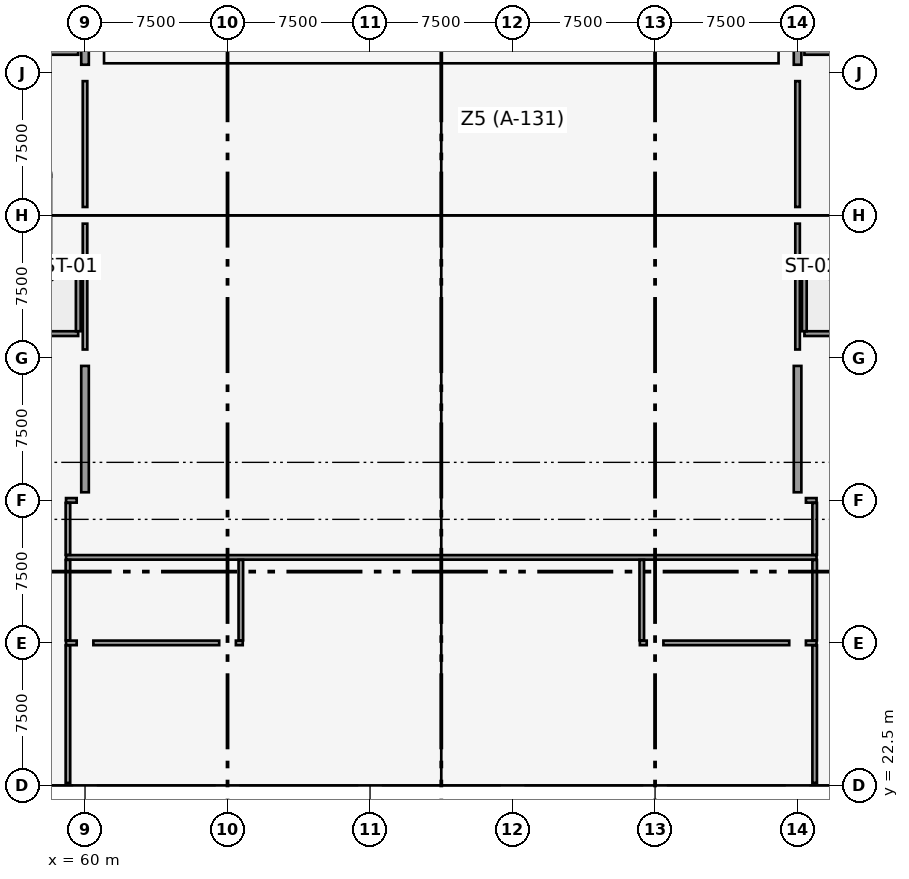
"""IFC4 building model, lengths in metres.
Left out: names, types, materials, properties, quantities, classifications, styles, units other than length and angle.
Written with IfcOpenShell. Run it as: python <this file> out.ifc"""

import sys

from ifc_helpers import new_model, si_unit, direction, frame, frame_2d, origin, origin_2d, place, context, subcontext, project, spatial, rectangle, extrude, element, fill, save


model = new_model("IFC4")
c1 = context("Model", 3, precision=1e-05, world=origin(), true_north=direction((0.0, 1.0)))
c2 = subcontext(c1, "Body", "Model", "MODEL_VIEW")
j1 = project(units=[si_unit("LENGTHUNIT", "METRE"), si_unit("PLANEANGLEUNIT", "RADIAN")], contexts=[c1])
p1 = place(None, origin())
s1 = spatial("IfcSite", under=j1, at=p1, CompositionType="ELEMENT")
p2 = place(p1, origin())
s2 = spatial("IfcBuilding", under=s1, at=p2, CompositionType="ELEMENT")
p3 = place(p2, frame((0.0, 0.0, 4.8)))
s3 = spatial("IfcBuildingStorey", under=s2, at=p3, CompositionType="ELEMENT", Elevation=4.8)
for number, where, z_axis, x_axis in (
    (1, (60.0, 22.5, 0.0), (0.0, 0.0, 1.0), (1.0, 0.0, 0.0)),
    (2, (60.0, 30.0, 0.0), (0.0, 0.0, 1.0), (1.0, 0.0, 0.0)),
    (3, (60.0, 37.5, 0.0), (0.0, 0.0, 1.0), (1.0, 0.0, 0.0)),
    (4, (60.0, 45.0, 0.0), (0.0, 0.0, 1.0), (1.0, 0.0, 0.0)),
    (5, (60.0, 52.5, 0.0), (0.0, 0.0, 1.0), (1.0, 0.0, 0.0)),
    (6, (60.0, 60.0, 0.0), (0.0, 0.0, 1.0), (1.0, 0.0, 0.0)),
    (7, (67.5, 22.5, 0.0), (0.0, 0.0, 1.0), (1.0, 0.0, 0.0)),
    (8, (67.5, 30.0, 0.0), (0.0, 0.0, 1.0), (1.0, 0.0, 0.0)),
    (9, (75.0, 22.5, 0.0), (0.0, 0.0, 1.0), (1.0, 0.0, 0.0)),
    (10, (75.0, 30.0, 0.0), (0.0, 0.0, 1.0), (1.0, 0.0, 0.0)),
    (11, (82.5, 22.5, 0.0), (0.0, 0.0, 1.0), (1.0, 0.0, 0.0)),
    (12, (82.5, 30.0, 0.0), (0.0, 0.0, 1.0), (1.0, 0.0, 0.0)),
    (13, (90.0, 22.5, 0.0), (0.0, 0.0, 1.0), (1.0, 0.0, 0.0)),
    (14, (90.0, 30.0, 0.0), (0.0, 0.0, 1.0), (1.0, 0.0, 0.0)),
    (15, (97.5, 22.5, 0.0), (0.0, 0.0, 1.0), (1.0, 0.0, 0.0)),
    (16, (97.5, 30.0, 0.0), (0.0, 0.0, 1.0), (1.0, 0.0, 0.0)),
    (17, (97.5, 37.5, 0.0), (0.0, 0.0, 1.0), (1.0, 0.0, 0.0)),
    (18, (97.5, 45.0, 0.0), (0.0, 0.0, 1.0), (1.0, 0.0, 0.0)),
    (19, (97.5, 52.5, 0.0), (0.0, 0.0, 1.0), (1.0, 0.0, 0.0)),
    (20, (97.5, 60.0, 0.0), (0.0, 0.0, 1.0), (1.0, 0.0, 0.0)),
):
    element("IfcColumn", number, at=place(p3, frame(where, z_axis=z_axis, x_axis=x_axis)), inside=s3, PredefinedType="COLUMN", context=c2, shape_type="SweptSolid", body=[
        extrude(rectangle(XDim=0.85, YDim=0.85, at=origin_2d()), origin(), (0.0, 0.0, 1.0), 4.2),
    ])
p4 = place(p3, frame((60.0, 37.925, 0.0), z_axis=(0.0, 0.0, 1.0), x_axis=(0.0, 1.0, 0.0)))
e21 = element("IfcWall", 21, at=p4, inside=s3, PredefinedType="SHEAR", context=c2, shape_type="SweptSolid", body=[
    extrude(rectangle(XDim=6.65, YDim=0.4, at=frame_2d((3.325, 0.0))), origin(), (0.0, 0.0, 1.0), 2.72),
])
p5 = place(p3, frame((60.0, 60.425, 0.0), z_axis=(0.0, 0.0, 1.0), x_axis=(0.0, 1.0, 0.0)))
e22 = element("IfcWall", 22, at=p5, inside=s3, PredefinedType="SHEAR", context=c2, shape_type="SweptSolid", body=[
    extrude(rectangle(XDim=6.65, YDim=0.4, at=frame_2d((3.325, 0.0))), origin(), (0.0, 0.0, 1.0), 2.97),
])
p6 = place(p3, frame((97.5, 37.925, 0.0), z_axis=(0.0, 0.0, 1.0), x_axis=(0.0, 1.0, 0.0)))
e23 = element("IfcWall", 23, at=p6, inside=s3, PredefinedType="SHEAR", context=c2, shape_type="SweptSolid", body=[
    extrude(rectangle(XDim=6.65, YDim=0.4, at=frame_2d((3.325, 0.0))), origin(), (0.0, 0.0, 1.0), 2.72),
])
p7 = place(p3, frame((97.5, 60.425, 0.0), z_axis=(0.0, 0.0, 1.0), x_axis=(0.0, 1.0, 0.0)))
e24 = element("IfcWall", 24, at=p7, inside=s3, PredefinedType="SHEAR", context=c2, shape_type="SweptSolid", body=[
    extrude(rectangle(XDim=6.65, YDim=0.4, at=frame_2d((3.325, 0.0))), origin(), (0.0, 0.0, 1.0), 2.87),
])
p8 = place(p3, frame((52.38, 46.275, 0.0), z_axis=(0.0, 0.0, 1.0), x_axis=(1.0, 0.0, 0.0)))
e25 = element("IfcWall", 25, at=p8, inside=s3, PredefinedType="SOLIDWALL", context=c2, shape_type="SweptSolid", body=[
    extrude(rectangle(XDim=7.26, YDim=0.25, at=frame_2d((3.63, 0.0))), origin(), (0.0, 0.0, 1.0), 3.92),
])
p9 = place(p8, frame((0.62, 0.0, 0.0)))
e26 = element("IfcOpeningElement", 26, at=p9, cuts=e25, PredefinedType="OPENING", context=c2, shape_type="SweptSolid", body=[
    extrude(rectangle(XDim=1.1, YDim=2.15, at=frame_2d((0.55, 1.075))), frame((0.0, 0.135, 0.0), z_axis=(0.0, -1.0, 0.0), x_axis=(1.0, 0.0, 0.0)), (0.0, 0.0, 1.0), 0.27),
])
p10 = place(p3, frame((52.38, 50.085, 0.0), z_axis=(0.0, 0.0, 1.0), x_axis=(1.0, 0.0, 0.0)))
e27 = element("IfcWall", 27, at=p10, inside=s3, PredefinedType="SOLIDWALL", context=c2, shape_type="SweptSolid", body=[
    extrude(rectangle(XDim=7.26, YDim=0.25, at=frame_2d((3.63, 0.0))), origin(), (0.0, 0.0, 1.0), 3.92),
])
p11 = place(p10, frame((0.62, 0.0, 0.0)))
e28 = element("IfcOpeningElement", 28, at=p11, cuts=e27, PredefinedType="OPENING", context=c2, shape_type="SweptSolid", body=[
    extrude(rectangle(XDim=1.1, YDim=2.15, at=frame_2d((0.55, 1.075))), frame((0.0, 0.135, 0.0), z_axis=(0.0, -1.0, 0.0), x_axis=(1.0, 0.0, 0.0)), (0.0, 0.0, 1.0), 0.27),
])
p12 = place(p3, frame((59.645, 46.4, 0.0), z_axis=(0.0, 0.0, 1.0), x_axis=(0.0, 1.0, 0.0)))
e29 = element("IfcWall", 29, at=p12, inside=s3, PredefinedType="SOLIDWALL", context=c2, shape_type="SweptSolid", body=[
    extrude(rectangle(XDim=3.56, YDim=0.25, at=frame_2d((1.78, 0.0))), origin(), (0.0, 0.0, 1.0), 3.92),
])
p13 = place(p3, frame((97.86, 46.275, 0.0), z_axis=(0.0, 0.0, 1.0), x_axis=(1.0, 0.0, 0.0)))
e30 = element("IfcWall", 30, at=p13, inside=s3, PredefinedType="SOLIDWALL", context=c2, shape_type="SweptSolid", body=[
    extrude(rectangle(XDim=7.26, YDim=0.25, at=frame_2d((3.63, 0.0))), origin(), (0.0, 0.0, 1.0), 3.92),
])
p14 = place(p13, frame((5.54, 0.0, 0.0)))
e31 = element("IfcOpeningElement", 31, at=p14, cuts=e30, PredefinedType="OPENING", context=c2, shape_type="SweptSolid", body=[
    extrude(rectangle(XDim=1.1, YDim=2.15, at=frame_2d((0.55, 1.075))), frame((0.0, 0.135, 0.0), z_axis=(0.0, -1.0, 0.0), x_axis=(1.0, 0.0, 0.0)), (0.0, 0.0, 1.0), 0.27),
])
p15 = place(p3, frame((97.86, 50.085, 0.0), z_axis=(0.0, 0.0, 1.0), x_axis=(1.0, 0.0, 0.0)))
e32 = element("IfcWall", 32, at=p15, inside=s3, PredefinedType="SOLIDWALL", context=c2, shape_type="SweptSolid", body=[
    extrude(rectangle(XDim=7.26, YDim=0.25, at=frame_2d((3.63, 0.0))), origin(), (0.0, 0.0, 1.0), 3.92),
])
p16 = place(p15, frame((5.54, 0.0, 0.0)))
e33 = element("IfcOpeningElement", 33, at=p16, cuts=e32, PredefinedType="OPENING", context=c2, shape_type="SweptSolid", body=[
    extrude(rectangle(XDim=1.1, YDim=2.15, at=frame_2d((0.55, 1.075))), frame((0.0, 0.135, 0.0), z_axis=(0.0, -1.0, 0.0), x_axis=(1.0, 0.0, 0.0)), (0.0, 0.0, 1.0), 0.27),
])
p17 = place(p3, frame((97.855, 46.4, 0.0), z_axis=(0.0, 0.0, 1.0), x_axis=(0.0, 1.0, 0.0)))
e34 = element("IfcWall", 34, at=p17, inside=s3, PredefinedType="SOLIDWALL", context=c2, shape_type="SweptSolid", body=[
    extrude(rectangle(XDim=3.56, YDim=0.25, at=frame_2d((1.78, 0.0))), origin(), (0.0, 0.0, 1.0), 3.92),
])
p18 = place(p3, frame((52.38, 61.075, 0.0), z_axis=(0.0, 0.0, 1.0), x_axis=(1.0, 0.0, 0.0)))
e35 = element("IfcWall", 35, at=p18, inside=s3, PredefinedType="SOLIDWALL", context=c2, shape_type="SweptSolid", body=[
    extrude(rectangle(XDim=7.26, YDim=0.25, at=frame_2d((3.63, 0.0))), origin(), (0.0, 0.0, 1.0), 3.92),
])
p19 = place(p18, frame((0.62, 0.0, 0.0)))
e36 = element("IfcOpeningElement", 36, at=p19, cuts=e35, PredefinedType="OPENING", context=c2, shape_type="SweptSolid", body=[
    extrude(rectangle(XDim=1.1, YDim=2.15, at=frame_2d((0.55, 1.075))), frame((0.0, 0.135, 0.0), z_axis=(0.0, -1.0, 0.0), x_axis=(1.0, 0.0, 0.0)), (0.0, 0.0, 1.0), 0.27),
])
p20 = place(p3, frame((97.86, 61.075, 0.0), z_axis=(0.0, 0.0, 1.0), x_axis=(1.0, 0.0, 0.0)))
e37 = element("IfcWall", 37, at=p20, inside=s3, PredefinedType="SOLIDWALL", context=c2, shape_type="SweptSolid", body=[
    extrude(rectangle(XDim=7.26, YDim=0.25, at=frame_2d((3.63, 0.0))), origin(), (0.0, 0.0, 1.0), 3.92),
])
p21 = place(p20, frame((5.54, 0.0, 0.0)))
e38 = element("IfcOpeningElement", 38, at=p21, cuts=e37, PredefinedType="OPENING", context=c2, shape_type="SweptSolid", body=[
    extrude(rectangle(XDim=1.1, YDim=2.15, at=frame_2d((0.55, 1.075))), frame((0.0, 0.135, 0.0), z_axis=(0.0, -1.0, 0.0), x_axis=(1.0, 0.0, 0.0)), (0.0, 0.0, 1.0), 0.27),
])
p22 = place(p3, frame((59.0, 30.0, 0.0), z_axis=(0.0, 0.0, 1.0), x_axis=(1.0, 0.0, 0.0)))
e39 = element("IfcWall", 39, at=p22, inside=s3, PredefinedType="PARTITIONING", context=c2, shape_type="SweptSolid", body=[
    extrude(rectangle(XDim=0.561, YDim=0.24, at=frame_2d((0.281, 0.0))), origin(), (0.0, 0.0, 1.0), 2.69),
])
p23 = place(p3, frame((60.439, 30.0, 0.0), z_axis=(0.0, 0.0, 1.0), x_axis=(1.0, 0.0, 0.0)))
e40 = element("IfcWall", 40, at=p23, inside=s3, PredefinedType="PARTITIONING", context=c2, shape_type="SweptSolid", body=[
    extrude(rectangle(XDim=6.622, YDim=0.24, at=frame_2d((3.311, 0.0))), origin(), (0.0, 0.0, 1.0), 2.69),
])
p24 = place(p3, frame((67.939, 30.0, 0.0), z_axis=(0.0, 0.0, 1.0), x_axis=(1.0, 0.0, 0.0)))
e41 = element("IfcWall", 41, at=p24, inside=s3, PredefinedType="PARTITIONING", context=c2, shape_type="SweptSolid", body=[
    extrude(rectangle(XDim=0.361, YDim=0.24, at=frame_2d((0.181, 0.0))), origin(), (0.0, 0.0, 1.0), 2.99),
])
p25 = place(p3, frame((89.2, 30.0, 0.0), z_axis=(0.0, 0.0, 1.0), x_axis=(1.0, 0.0, 0.0)))
e42 = element("IfcWall", 42, at=p25, inside=s3, PredefinedType="PARTITIONING", context=c2, shape_type="SweptSolid", body=[
    extrude(rectangle(XDim=0.361, YDim=0.24, at=frame_2d((0.181, 0.0))), origin(), (0.0, 0.0, 1.0), 3.04),
])
p26 = place(p3, frame((90.439, 30.0, 0.0), z_axis=(0.0, 0.0, 1.0), x_axis=(1.0, 0.0, 0.0)))
e43 = element("IfcWall", 43, at=p26, inside=s3, PredefinedType="PARTITIONING", context=c2, shape_type="SweptSolid", body=[
    extrude(rectangle(XDim=6.622, YDim=0.24, at=frame_2d((3.311, 0.0))), origin(), (0.0, 0.0, 1.0), 2.69),
])
for number, where, z_axis, x_axis in (
    (44, (97.939, 30.0, 0.0), (0.0, 0.0, 1.0), (1.0, 0.0, 0.0)),
    (45, (59.0, 37.5, 0.0), (0.0, 0.0, 1.0), (1.0, 0.0, 0.0)),
    (46, (97.939, 37.5, 0.0), (0.0, 0.0, 1.0), (1.0, 0.0, 0.0)),
):
    element("IfcWall", number, at=place(p3, frame(where, z_axis=z_axis, x_axis=x_axis)), inside=s3, PredefinedType="PARTITIONING", context=c2, shape_type="SweptSolid", body=[
        extrude(rectangle(XDim=0.561, YDim=0.24, at=frame_2d((0.281, 0.0))), origin(), (0.0, 0.0, 1.0), 2.69),
    ])
p27 = place(p3, frame((59.0, 34.5, 0.0), z_axis=(0.0, 0.0, 1.0), x_axis=(1.0, 0.0, 0.0)))
e47 = element("IfcWall", 47, at=p27, inside=s3, PredefinedType="PARTITIONING", context=c2, shape_type="SweptSolid", body=[
    extrude(rectangle(XDim=39.5, YDim=0.24, at=frame_2d((19.75, 0.0))), origin(), (0.0, 0.0, 1.0), 2.69),
])
p28 = place(p27, frame((3.85, 0.0, 0.0)))
e48 = element("IfcOpeningElement", 48, at=p28, cuts=e47, PredefinedType="OPENING", context=c2, shape_type="SweptSolid", body=[
    extrude(rectangle(XDim=1.8, YDim=2.16, at=frame_2d((0.9, 1.08))), frame((0.0, 0.13, 0.0), z_axis=(0.0, -1.0, 0.0), x_axis=(1.0, 0.0, 0.0)), (0.0, 0.0, 1.0), 0.26),
])
p29 = place(p27, frame((33.85, 0.0, 0.0)))
e49 = element("IfcOpeningElement", 49, at=p29, cuts=e47, PredefinedType="OPENING", context=c2, shape_type="SweptSolid", body=[
    extrude(rectangle(XDim=1.8, YDim=2.16, at=frame_2d((0.9, 1.08))), frame((0.0, 0.13, 0.0), z_axis=(0.0, -1.0, 0.0), x_axis=(1.0, 0.0, 0.0)), (0.0, 0.0, 1.0), 0.26),
])
p30 = place(p3, frame((68.2, 30.134, 0.0), z_axis=(0.0, 0.0, 1.0), x_axis=(0.0, 1.0, 0.0)))
e50 = element("IfcWall", 50, at=p30, inside=s3, PredefinedType="PARTITIONING", context=c2, shape_type="SweptSolid", body=[
    extrude(rectangle(XDim=4.232, YDim=0.24, at=frame_2d((2.116, 0.0))), origin(), (0.0, 0.0, 1.0), 2.99),
])
p31 = place(p30, frame((1.366, 0.0, 0.0)))
e51 = element("IfcOpeningElement", 51, at=p31, cuts=e50, PredefinedType="OPENING", context=c2, shape_type="SweptSolid", body=[
    extrude(rectangle(XDim=1.5, YDim=2.16, at=frame_2d((0.75, 1.08))), frame((0.0, 0.13, 0.0), z_axis=(0.0, -1.0, 0.0), x_axis=(1.0, 0.0, 0.0)), (0.0, 0.0, 1.0), 0.26),
])
p32 = place(p3, frame((89.3, 30.134, 0.0), z_axis=(0.0, 0.0, 1.0), x_axis=(0.0, 1.0, 0.0)))
e52 = element("IfcWall", 52, at=p32, inside=s3, PredefinedType="PARTITIONING", context=c2, shape_type="SweptSolid", body=[
    extrude(rectangle(XDim=4.232, YDim=0.24, at=frame_2d((2.116, 0.0))), origin(), (0.0, 0.0, 1.0), 3.04),
])
p33 = place(p32, frame((1.366, 0.0, 0.0)))
e53 = element("IfcOpeningElement", 53, at=p33, cuts=e52, PredefinedType="OPENING", context=c2, shape_type="SweptSolid", body=[
    extrude(rectangle(XDim=1.5, YDim=2.16, at=frame_2d((0.75, 1.08))), frame((0.0, 0.13, 0.0), z_axis=(0.0, -1.0, 0.0), x_axis=(1.0, 0.0, 0.0)), (0.0, 0.0, 1.0), 0.26),
])
p34 = place(p3, frame((59.1, 22.632, 0.0), z_axis=(0.0, 0.0, 1.0), x_axis=(0.0, 1.0, 0.0)))
e54 = element("IfcWall", 54, at=p34, inside=s3, PredefinedType="PARTITIONING", context=c2, shape_type="SweptSolid", body=[
    extrude(rectangle(XDim=7.234, YDim=0.24, at=frame_2d((3.617, 0.0))), origin(), (0.0, 0.0, 1.0), 2.94),
])
p35 = place(p34, frame((2.868, 0.0, 0.0)))
e55 = element("IfcOpeningElement", 55, at=p35, cuts=e54, PredefinedType="OPENING", context=c2, shape_type="SweptSolid", body=[
    extrude(rectangle(XDim=1.5, YDim=2.16, at=frame_2d((0.75, 1.08))), frame((0.0, 0.13, 0.0), z_axis=(0.0, -1.0, 0.0), x_axis=(1.0, 0.0, 0.0)), (0.0, 0.0, 1.0), 0.26),
])
p36 = place(p3, frame((59.1, 30.134, 0.0), z_axis=(0.0, 0.0, 1.0), x_axis=(0.0, 1.0, 0.0)))
e56 = element("IfcWall", 56, at=p36, inside=s3, PredefinedType="PARTITIONING", context=c2, shape_type="SweptSolid", body=[
    extrude(rectangle(XDim=4.232, YDim=0.24, at=frame_2d((2.116, 0.0))), origin(), (0.0, 0.0, 1.0), 2.94),
])
p37 = place(p36, frame((1.216, 0.0, 0.0)))
e57 = element("IfcOpeningElement", 57, at=p37, cuts=e56, PredefinedType="OPENING", context=c2, shape_type="SweptSolid", body=[
    extrude(rectangle(XDim=1.8, YDim=2.16, at=frame_2d((0.9, 1.08))), frame((0.0, 0.13, 0.0), z_axis=(0.0, -1.0, 0.0), x_axis=(1.0, 0.0, 0.0)), (0.0, 0.0, 1.0), 0.26),
])
p38 = place(p3, frame((59.1, 34.634, 0.0), z_axis=(0.0, 0.0, 1.0), x_axis=(0.0, 1.0, 0.0)))
e58 = element("IfcWall", 58, at=p38, inside=s3, PredefinedType="PARTITIONING", context=c2, shape_type="SweptSolid", body=[
    extrude(rectangle(XDim=2.732, YDim=0.24, at=frame_2d((1.366, 0.0))), origin(), (0.0, 0.0, 1.0), 2.99),
])
p39 = place(p3, frame((98.4, 22.632, 0.0), z_axis=(0.0, 0.0, 1.0), x_axis=(0.0, 1.0, 0.0)))
e59 = element("IfcWall", 59, at=p39, inside=s3, PredefinedType="PARTITIONING", context=c2, shape_type="SweptSolid", body=[
    extrude(rectangle(XDim=7.234, YDim=0.24, at=frame_2d((3.617, 0.0))), origin(), (0.0, 0.0, 1.0), 2.84),
])
p40 = place(p39, frame((2.868, 0.0, 0.0)))
e60 = element("IfcOpeningElement", 60, at=p40, cuts=e59, PredefinedType="OPENING", context=c2, shape_type="SweptSolid", body=[
    extrude(rectangle(XDim=1.5, YDim=2.16, at=frame_2d((0.75, 1.08))), frame((0.0, 0.13, 0.0), z_axis=(0.0, -1.0, 0.0), x_axis=(1.0, 0.0, 0.0)), (0.0, 0.0, 1.0), 0.26),
])
p41 = place(p3, frame((98.4, 30.134, 0.0), z_axis=(0.0, 0.0, 1.0), x_axis=(0.0, 1.0, 0.0)))
e61 = element("IfcWall", 61, at=p41, inside=s3, PredefinedType="PARTITIONING", context=c2, shape_type="SweptSolid", body=[
    extrude(rectangle(XDim=4.232, YDim=0.24, at=frame_2d((2.116, 0.0))), origin(), (0.0, 0.0, 1.0), 2.84),
])
p42 = place(p41, frame((1.216, 0.0, 0.0)))
e62 = element("IfcOpeningElement", 62, at=p42, cuts=e61, PredefinedType="OPENING", context=c2, shape_type="SweptSolid", body=[
    extrude(rectangle(XDim=1.8, YDim=2.16, at=frame_2d((0.9, 1.08))), frame((0.0, 0.13, 0.0), z_axis=(0.0, -1.0, 0.0), x_axis=(1.0, 0.0, 0.0)), (0.0, 0.0, 1.0), 0.26),
])
p43 = place(p3, frame((98.4, 34.634, 0.0), z_axis=(0.0, 0.0, 1.0), x_axis=(0.0, 1.0, 0.0)))
e63 = element("IfcWall", 63, at=p43, inside=s3, PredefinedType="PARTITIONING", context=c2, shape_type="SweptSolid", body=[
    extrude(rectangle(XDim=2.732, YDim=0.24, at=frame_2d((1.366, 0.0))), origin(), (0.0, 0.0, 1.0), 3.09),
])
p44 = place(p3, frame((60.0, 45.439, 0.0), z_axis=(0.0, 0.0, 1.0), x_axis=(0.0, 1.0, 0.0)))
e64 = element("IfcWall", 64, at=p44, inside=s3, PredefinedType="PARTITIONING", context=c2, shape_type="SweptSolid", body=[
    extrude(rectangle(XDim=6.622, YDim=0.24, at=frame_2d((3.311, 0.0))), origin(), (0.0, 0.0, 1.0), 2.84),
])
p45 = place(p3, frame((60.0, 52.939, 0.0), z_axis=(0.0, 0.0, 1.0), x_axis=(0.0, 1.0, 0.0)))
e65 = element("IfcWall", 65, at=p45, inside=s3, PredefinedType="PARTITIONING", context=c2, shape_type="SweptSolid", body=[
    extrude(rectangle(XDim=6.622, YDim=0.24, at=frame_2d((3.311, 0.0))), origin(), (0.0, 0.0, 1.0), 2.84),
])
p46 = place(p45, frame((2.411, 0.0, 0.0)))
e66 = element("IfcOpeningElement", 66, at=p46, cuts=e65, PredefinedType="OPENING", context=c2, shape_type="SweptSolid", body=[
    extrude(rectangle(XDim=1.8, YDim=2.16, at=frame_2d((0.9, 1.08))), frame((0.0, 0.13, 0.0), z_axis=(0.0, -1.0, 0.0), x_axis=(1.0, 0.0, 0.0)), (0.0, 0.0, 1.0), 0.26),
])
p47 = place(p3, frame((97.5, 45.439, 0.0), z_axis=(0.0, 0.0, 1.0), x_axis=(0.0, 1.0, 0.0)))
e67 = element("IfcWall", 67, at=p47, inside=s3, PredefinedType="PARTITIONING", context=c2, shape_type="SweptSolid", body=[
    extrude(rectangle(XDim=6.622, YDim=0.24, at=frame_2d((3.311, 0.0))), origin(), (0.0, 0.0, 1.0), 2.94),
])
p48 = place(p3, frame((97.5, 52.939, 0.0), z_axis=(0.0, 0.0, 1.0), x_axis=(0.0, 1.0, 0.0)))
e68 = element("IfcWall", 68, at=p48, inside=s3, PredefinedType="PARTITIONING", context=c2, shape_type="SweptSolid", body=[
    extrude(rectangle(XDim=6.622, YDim=0.24, at=frame_2d((3.311, 0.0))), origin(), (0.0, 0.0, 1.0), 2.99),
])
p49 = place(p48, frame((2.411, 0.0, 0.0)))
e69 = element("IfcOpeningElement", 69, at=p49, cuts=e68, PredefinedType="OPENING", context=c2, shape_type="SweptSolid", body=[
    extrude(rectangle(XDim=1.8, YDim=2.16, at=frame_2d((0.9, 1.08))), frame((0.0, 0.13, 0.0), z_axis=(0.0, -1.0, 0.0), x_axis=(1.0, 0.0, 0.0)), (0.0, 0.0, 1.0), 0.26),
])
p50 = place(p28, origin())
e70 = element("IfcDoor", 70, at=p50, inside=s3, OperationType="SINGLE_SWING_RIGHT", PredefinedType="DOOR", context=c2, shape_type="SweptSolid", body=[
    extrude(rectangle(XDim=1.8, YDim=2.16, at=frame_2d((0.9, 1.08))), frame((0.0, 0.025, 0.0), z_axis=(0.0, -1.0, 0.0), x_axis=(1.0, 0.0, 0.0)), (0.0, 0.0, 1.0), 0.05),
])
fill(e48, e70)
p51 = place(p29, origin())
e71 = element("IfcDoor", 71, at=p51, inside=s3, OperationType="SINGLE_SWING_LEFT", PredefinedType="DOOR", context=c2, shape_type="SweptSolid", body=[
    extrude(rectangle(XDim=1.8, YDim=2.16, at=frame_2d((0.9, 1.08))), frame((0.0, 0.025, 0.0), z_axis=(0.0, -1.0, 0.0), x_axis=(1.0, 0.0, 0.0)), (0.0, 0.0, 1.0), 0.05),
])
fill(e49, e71)
p52 = place(p31, origin())
e72 = element("IfcDoor", 72, at=p52, inside=s3, OperationType="SINGLE_SWING_RIGHT", PredefinedType="DOOR", context=c2, shape_type="SweptSolid", body=[
    extrude(rectangle(XDim=1.5, YDim=2.16, at=frame_2d((0.75, 1.08))), frame((0.0, 0.025, 0.0), z_axis=(0.0, -1.0, 0.0), x_axis=(1.0, 0.0, 0.0)), (0.0, 0.0, 1.0), 0.05),
])
fill(e51, e72)
p53 = place(p33, origin())
e73 = element("IfcDoor", 73, at=p53, inside=s3, OperationType="SINGLE_SWING_LEFT", PredefinedType="DOOR", context=c2, shape_type="SweptSolid", body=[
    extrude(rectangle(XDim=1.5, YDim=2.16, at=frame_2d((0.75, 1.08))), frame((0.0, 0.025, 0.0), z_axis=(0.0, -1.0, 0.0), x_axis=(1.0, 0.0, 0.0)), (0.0, 0.0, 1.0), 0.05),
])
fill(e53, e73)
p54 = place(p35, origin())
e74 = element("IfcDoor", 74, at=p54, inside=s3, OperationType="SINGLE_SWING_RIGHT", PredefinedType="DOOR", context=c2, shape_type="SweptSolid", body=[
    extrude(rectangle(XDim=1.5, YDim=2.16, at=frame_2d((0.75, 1.08))), frame((0.0, 0.025, 0.0), z_axis=(0.0, -1.0, 0.0), x_axis=(1.0, 0.0, 0.0)), (0.0, 0.0, 1.0), 0.05),
])
fill(e55, e74)
p55 = place(p37, origin())
e75 = element("IfcDoor", 75, at=p55, inside=s3, OperationType="SINGLE_SWING_LEFT", PredefinedType="DOOR", context=c2, shape_type="SweptSolid", body=[
    extrude(rectangle(XDim=1.8, YDim=2.16, at=frame_2d((0.9, 1.08))), frame((0.0, 0.025, 0.0), z_axis=(0.0, -1.0, 0.0), x_axis=(1.0, 0.0, 0.0)), (0.0, 0.0, 1.0), 0.05),
])
fill(e57, e75)
p56 = place(p40, origin())
e76 = element("IfcDoor", 76, at=p56, inside=s3, OperationType="SINGLE_SWING_RIGHT", PredefinedType="DOOR", context=c2, shape_type="SweptSolid", body=[
    extrude(rectangle(XDim=1.5, YDim=2.16, at=frame_2d((0.75, 1.08))), frame((0.0, 0.025, 0.0), z_axis=(0.0, -1.0, 0.0), x_axis=(1.0, 0.0, 0.0)), (0.0, 0.0, 1.0), 0.05),
])
fill(e60, e76)
p57 = place(p42, origin())
e77 = element("IfcDoor", 77, at=p57, inside=s3, OperationType="SINGLE_SWING_LEFT", PredefinedType="DOOR", context=c2, shape_type="SweptSolid", body=[
    extrude(rectangle(XDim=1.8, YDim=2.16, at=frame_2d((0.9, 1.08))), frame((0.0, 0.025, 0.0), z_axis=(0.0, -1.0, 0.0), x_axis=(1.0, 0.0, 0.0)), (0.0, 0.0, 1.0), 0.05),
])
fill(e62, e77)
p58 = place(p46, origin())
e78 = element("IfcDoor", 78, at=p58, inside=s3, OperationType="SINGLE_SWING_RIGHT", PredefinedType="DOOR", context=c2, shape_type="SweptSolid", body=[
    extrude(rectangle(XDim=1.8, YDim=2.16, at=frame_2d((0.9, 1.08))), frame((0.0, 0.025, 0.0), z_axis=(0.0, -1.0, 0.0), x_axis=(1.0, 0.0, 0.0)), (0.0, 0.0, 1.0), 0.05),
])
fill(e66, e78)
p59 = place(p49, origin())
e79 = element("IfcDoor", 79, at=p59, inside=s3, OperationType="SINGLE_SWING_LEFT", PredefinedType="DOOR", context=c2, shape_type="SweptSolid", body=[
    extrude(rectangle(XDim=1.8, YDim=2.16, at=frame_2d((0.9, 1.08))), frame((0.0, 0.025, 0.0), z_axis=(0.0, -1.0, 0.0), x_axis=(1.0, 0.0, 0.0)), (0.0, 0.0, 1.0), 0.05),
])
fill(e69, e79)
save(model, sys.argv[1])
